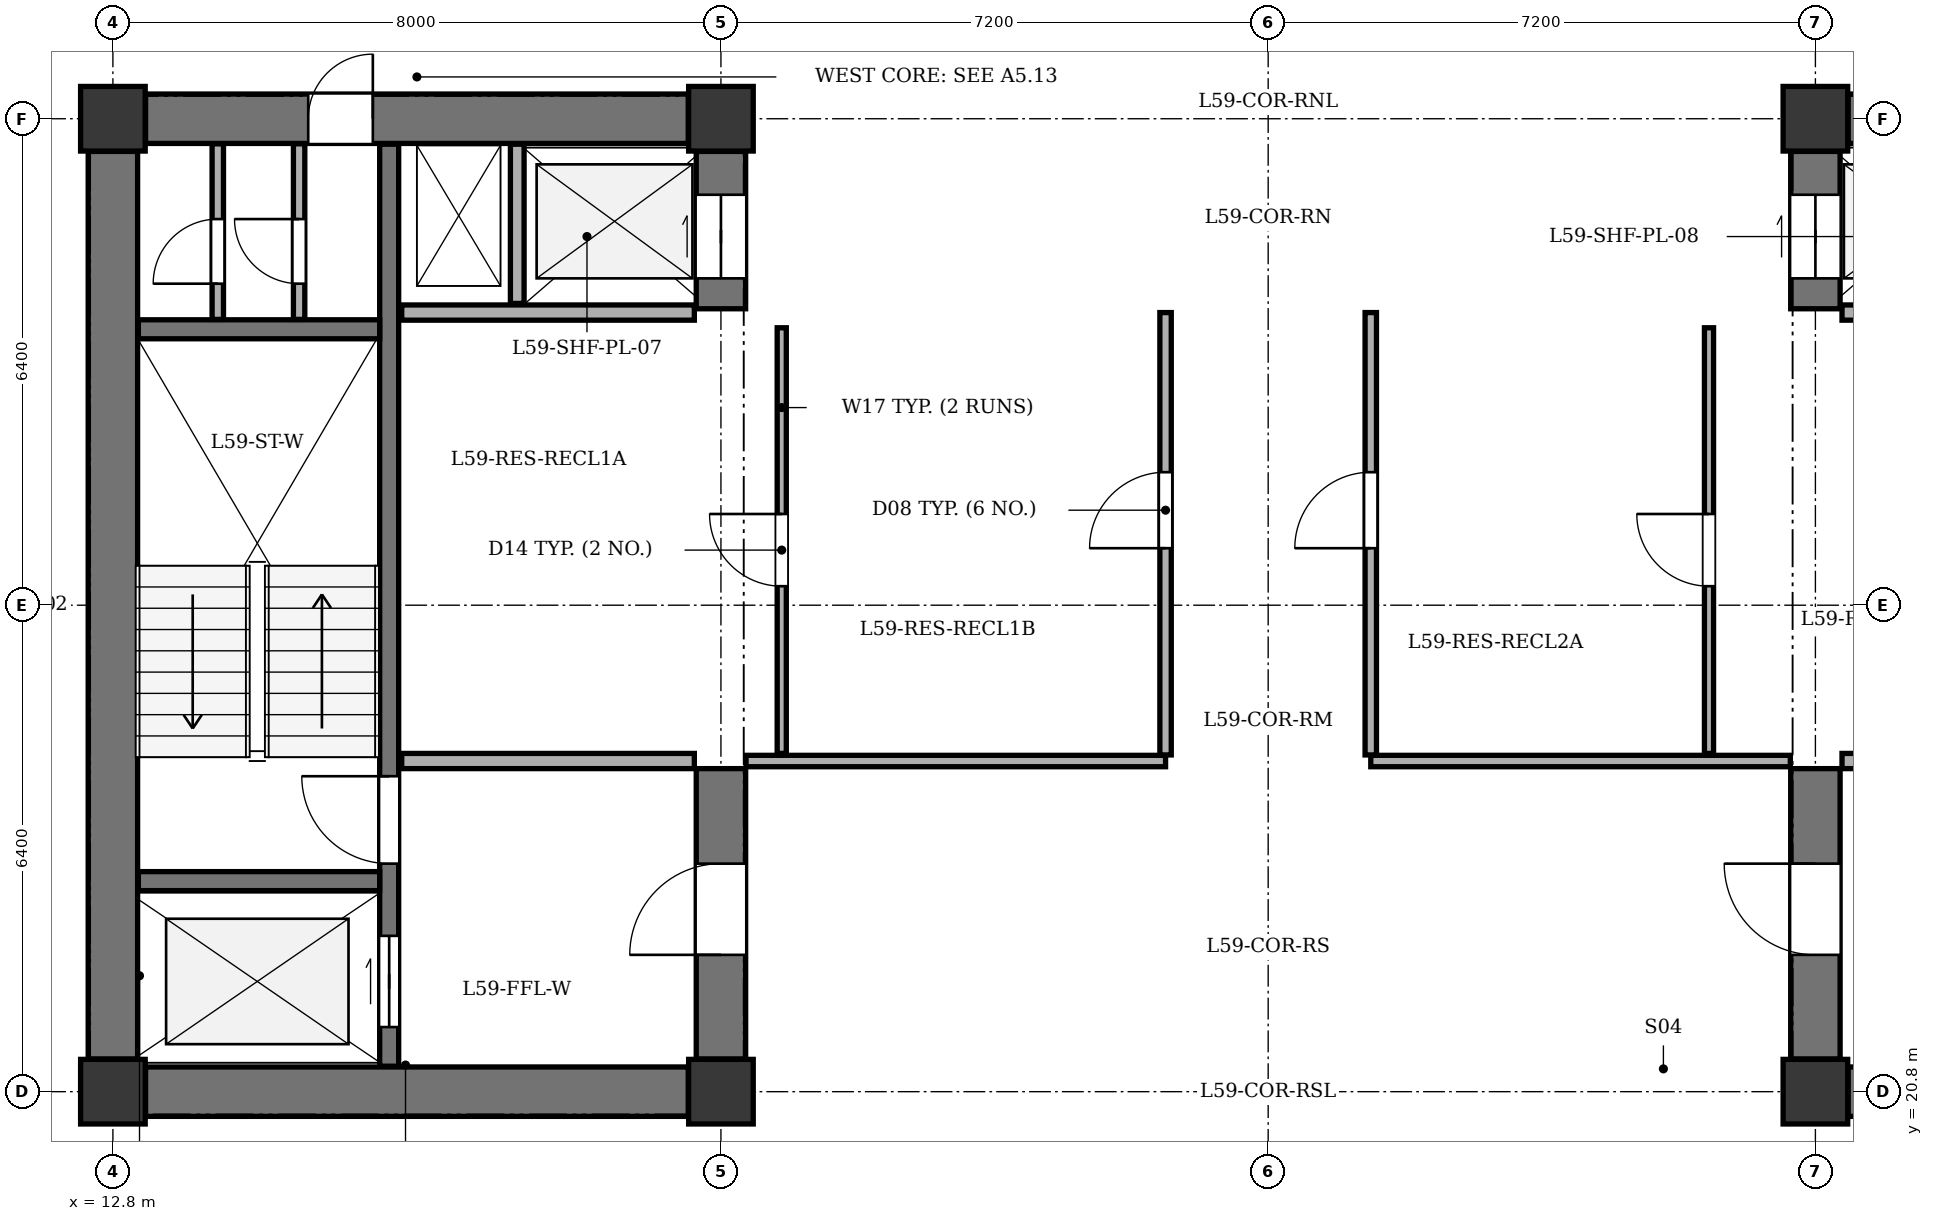
"""IFC4 building model, lengths in metres.
Left out: names, types, materials, properties, quantities, classifications, styles, units other than length and angle.
Written with IfcOpenShell. Run it as: python <this file> out.ifc"""

import sys

from ifc_helpers import new_model, si_unit, direction, frame, frame_2d, origin, origin_2d, place, context, subcontext, project, spatial, rectangle, extrude, element, fill, save


model = new_model("IFC4")
c1 = context("Model", 3, precision=1e-05, world=origin(), true_north=direction((0.0, 1.0)))
c2 = subcontext(c1, "Body", "Model", "MODEL_VIEW")
j1 = project(units=[si_unit("LENGTHUNIT", "METRE"), si_unit("PLANEANGLEUNIT", "RADIAN")], contexts=[c1])
p1 = place(None, origin())
s1 = spatial("IfcSite", under=j1, at=p1, CompositionType="ELEMENT")
p2 = place(p1, origin())
s2 = spatial("IfcBuilding", under=s1, at=p2, CompositionType="ELEMENT")
p3 = place(p2, frame((0.0, 0.0, 227.9)))
s3 = spatial("IfcBuildingStorey", under=s2, at=p3, CompositionType="ELEMENT", Elevation=227.9)
for number, where, z_axis, x_axis in (
    (1, (12.8, 20.8, 0.0), (0.0, 0.0, 1.0), (1.0, 0.0, 0.0)),
    (2, (20.8, 20.8, 0.0), (0.0, 0.0, 1.0), (1.0, 0.0, 0.0)),
    (3, (12.8, 33.6, 0.0), (0.0, 0.0, 1.0), (1.0, 0.0, 0.0)),
    (4, (20.8, 33.6, 0.0), (0.0, 0.0, 1.0), (1.0, 0.0, 0.0)),
    (5, (35.2, 20.8, 0.0), (0.0, 0.0, 1.0), (1.0, 0.0, 0.0)),
    (6, (35.2, 33.6, 0.0), (0.0, 0.0, 1.0), (1.0, 0.0, 0.0)),
):
    element("IfcColumn", number, at=place(p3, frame(where, z_axis=z_axis, x_axis=x_axis)), inside=s3, PredefinedType="COLUMN", context=c2, shape_type="SweptSolid", body=[
        extrude(rectangle(XDim=0.85, YDim=0.85, at=origin_2d()), origin(), (0.0, 0.0, 1.0), 3.4),
    ])
p4 = place(p3, frame((12.8, 21.23, 0.0), z_axis=(0.0, 0.0, 1.0), x_axis=(0.0, 1.0, 0.0)))
e7 = element("IfcWall", 7, at=p4, inside=s3, PredefinedType="SHEAR", context=c2, shape_type="SweptSolid", body=[
    extrude(rectangle(XDim=11.94, YDim=0.65, at=frame_2d((5.97, 0.0))), origin(), (0.0, 0.0, 1.0), 3.1),
])
p5 = place(p3, frame((13.23, 20.8, 0.0), z_axis=(0.0, 0.0, 1.0), x_axis=(1.0, 0.0, 0.0)))
e8 = element("IfcWall", 8, at=p5, inside=s3, PredefinedType="SHEAR", context=c2, shape_type="SweptSolid", body=[
    extrude(rectangle(XDim=7.14, YDim=0.65, at=frame_2d((3.57, 0.0))), origin(), (0.0, 0.0, 1.0), 3.1),
])
p6 = place(p3, frame((13.23, 33.6, 0.0), z_axis=(0.0, 0.0, 1.0), x_axis=(1.0, 0.0, 0.0)))
e9 = element("IfcWall", 9, at=p6, inside=s3, PredefinedType="SHEAR", context=c2, shape_type="SweptSolid", body=[
    extrude(rectangle(XDim=7.14, YDim=0.65, at=frame_2d((3.57, 0.0))), origin(), (0.0, 0.0, 1.0), 3.1),
])
p7 = place(p6, frame((2.14, 0.0, 0.0)))
e10 = element("IfcOpeningElement", 10, at=p7, cuts=e9, PredefinedType="OPENING", context=c2, shape_type="SweptSolid", body=[
    extrude(rectangle(XDim=0.85, YDim=2.02, at=frame_2d((0.425, 1.01))), frame((0.0, 0.335, 0.0), z_axis=(0.0, -1.0, 0.0), x_axis=(1.0, 0.0, 0.0)), (0.0, 0.0, 1.0), 0.67),
])
p8 = place(p3, frame((20.8, 21.23, 0.0), z_axis=(0.0, 0.0, 1.0), x_axis=(0.0, 1.0, 0.0)))
e11 = element("IfcWall", 11, at=p8, inside=s3, PredefinedType="SHEAR", context=c2, shape_type="SweptSolid", body=[
    extrude(rectangle(XDim=3.82, YDim=0.65, at=frame_2d((1.91, 0.0))), origin(), (0.0, 0.0, 1.0), 3.1),
])
p9 = place(p8, frame((1.37, 0.0, 0.0)))
e12 = element("IfcOpeningElement", 12, at=p9, cuts=e11, PredefinedType="OPENING", context=c2, shape_type="SweptSolid", body=[
    extrude(rectangle(XDim=1.2, YDim=2.15, at=frame_2d((0.6, 1.075))), frame((0.0, 0.335, 0.0), z_axis=(0.0, -1.0, 0.0), x_axis=(1.0, 0.0, 0.0)), (0.0, 0.0, 1.0), 0.67),
])
p10 = place(p3, frame((20.8, 31.1, 0.0), z_axis=(0.0, 0.0, 1.0), x_axis=(0.0, 1.0, 0.0)))
e13 = element("IfcWall", 13, at=p10, inside=s3, PredefinedType="SHEAR", context=c2, shape_type="SweptSolid", body=[
    extrude(rectangle(XDim=2.07, YDim=0.65, at=frame_2d((1.035, 0.0))), origin(), (0.0, 0.0, 1.0), 3.1),
])
p11 = place(p10, frame((0.4, 0.0, 0.0)))
e14 = element("IfcOpeningElement", 14, at=p11, cuts=e13, PredefinedType="OPENING", context=c2, shape_type="SweptSolid", body=[
    extrude(rectangle(XDim=1.1, YDim=2.1, at=frame_2d((0.55, 1.05))), frame((0.0, 0.335, 0.0), z_axis=(0.0, -1.0, 0.0), x_axis=(1.0, 0.0, 0.0)), (0.0, 0.0, 1.0), 0.67),
])
p12 = place(p3, frame((16.435, 21.135, 0.0), z_axis=(0.0, 0.0, 1.0), x_axis=(0.0, 1.0, 0.0)))
e15 = element("IfcWall", 15, at=p12, inside=s3, PredefinedType="SHEAR", context=c2, shape_type="SweptSolid", body=[
    extrude(rectangle(XDim=12.13, YDim=0.25, at=frame_2d((6.065, 0.0))), origin(), (0.0, 0.0, 1.0), 3.1),
])
p13 = place(p12, frame((0.515, 0.0, 0.0)))
e16 = element("IfcOpeningElement", 16, at=p13, cuts=e15, PredefinedType="OPENING", context=c2, shape_type="SweptSolid", body=[
    extrude(rectangle(XDim=1.2, YDim=2.15, at=frame_2d((0.6, 1.075))), frame((0.0, 0.135, 0.0), z_axis=(0.0, -1.0, 0.0), x_axis=(1.0, 0.0, 0.0)), (0.0, 0.0, 1.0), 0.27),
])
p14 = place(p12, frame((2.665, 0.0, 0.0)))
e17 = element("IfcOpeningElement", 17, at=p14, cuts=e15, PredefinedType="OPENING", context=c2, shape_type="SweptSolid", body=[
    extrude(rectangle(XDim=1.15, YDim=2.15, at=frame_2d((0.575, 1.075))), frame((0.0, 0.135, 0.0), z_axis=(0.0, -1.0, 0.0), x_axis=(1.0, 0.0, 0.0)), (0.0, 0.0, 1.0), 0.27),
])
for number, where, z_axis, x_axis in (
    (18, (13.135, 23.57, 0.0), (0.0, 0.0, 1.0), (1.0, 0.0, 0.0)),
    (19, (13.135, 30.83, 0.0), (0.0, 0.0, 1.0), (1.0, 0.0, 0.0)),
):
    element("IfcWall", number, at=place(p3, frame(where, z_axis=z_axis, x_axis=x_axis)), inside=s3, PredefinedType="SHEAR", context=c2, shape_type="SweptSolid", body=[
        extrude(rectangle(XDim=3.175, YDim=0.25, at=frame_2d((1.587, 0.0))), origin(), (0.0, 0.0, 1.0), 3.1),
    ])
for number, where, z_axis, x_axis in (
    (20, (16.6, 25.15, 0.0), (0.0, 0.0, 1.0), (1.0, 0.0, 0.0)),
    (21, (16.6, 31.05, 0.0), (0.0, 0.0, 1.0), (1.0, 0.0, 0.0)),
):
    element("IfcWall", number, at=place(p3, frame(where, z_axis=z_axis, x_axis=x_axis)), inside=s3, PredefinedType="SOLIDWALL", context=c2, shape_type="SweptSolid", body=[
        extrude(rectangle(XDim=3.85, YDim=0.2, at=frame_2d((1.925, 0.0))), origin(), (0.0, 0.0, 1.0), 3.1),
    ])
p15 = place(p3, frame((18.12, 31.17, 0.0), z_axis=(0.0, 0.0, 1.0), x_axis=(0.0, 1.0, 0.0)))
e22 = element("IfcWall", 22, at=p15, inside=s3, PredefinedType="PARTITIONING", context=c2, shape_type="SweptSolid", body=[
    extrude(rectangle(XDim=2.095, YDim=0.18, at=frame_2d((1.047, 0.0))), origin(), (0.0, 0.0, 1.0), 3.1),
])
p16 = place(p3, frame((35.63, 20.8, 0.0), z_axis=(0.0, 0.0, 1.0), x_axis=(1.0, 0.0, 0.0)))
e23 = element("IfcWall", 23, at=p16, inside=s3, PredefinedType="SHEAR", context=c2, shape_type="SweptSolid", body=[
    extrude(rectangle(XDim=7.14, YDim=0.65, at=frame_2d((3.57, 0.0))), origin(), (0.0, 0.0, 1.0), 3.1),
])
p17 = place(p3, frame((35.63, 33.6, 0.0), z_axis=(0.0, 0.0, 1.0), x_axis=(1.0, 0.0, 0.0)))
e24 = element("IfcWall", 24, at=p17, inside=s3, PredefinedType="SHEAR", context=c2, shape_type="SweptSolid", body=[
    extrude(rectangle(XDim=7.14, YDim=0.65, at=frame_2d((3.57, 0.0))), origin(), (0.0, 0.0, 1.0), 3.1),
])
p18 = place(p17, frame((4.77, 0.0, 0.0)))
e25 = element("IfcOpeningElement", 25, at=p18, cuts=e24, PredefinedType="OPENING", context=c2, shape_type="SweptSolid", body=[
    extrude(rectangle(XDim=1.3, YDim=2.15, at=frame_2d((0.65, 1.075))), frame((0.0, 0.335, 0.0), z_axis=(0.0, -1.0, 0.0), x_axis=(1.0, 0.0, 0.0)), (0.0, 0.0, 1.0), 0.67),
])
p19 = place(p17, frame((2.57, 0.0, 0.0)))
e26 = element("IfcOpeningElement", 26, at=p19, cuts=e24, PredefinedType="OPENING", context=c2, shape_type="SweptSolid", body=[
    extrude(rectangle(XDim=0.85, YDim=2.02, at=frame_2d((0.425, 1.01))), frame((0.0, 0.335, 0.0), z_axis=(0.0, -1.0, 0.0), x_axis=(1.0, 0.0, 0.0)), (0.0, 0.0, 1.0), 0.67),
])
p20 = place(p3, frame((35.2, 21.23, 0.0), z_axis=(0.0, 0.0, 1.0), x_axis=(0.0, 1.0, 0.0)))
e27 = element("IfcWall", 27, at=p20, inside=s3, PredefinedType="SHEAR", context=c2, shape_type="SweptSolid", body=[
    extrude(rectangle(XDim=3.82, YDim=0.65, at=frame_2d((1.91, 0.0))), origin(), (0.0, 0.0, 1.0), 3.1),
])
p21 = place(p20, frame((1.37, 0.0, 0.0)))
e28 = element("IfcOpeningElement", 28, at=p21, cuts=e27, PredefinedType="OPENING", context=c2, shape_type="SweptSolid", body=[
    extrude(rectangle(XDim=1.2, YDim=2.15, at=frame_2d((0.6, 1.075))), frame((0.0, 0.335, 0.0), z_axis=(0.0, -1.0, 0.0), x_axis=(1.0, 0.0, 0.0)), (0.0, 0.0, 1.0), 0.67),
])
p22 = place(p3, frame((35.2, 31.1, 0.0), z_axis=(0.0, 0.0, 1.0), x_axis=(0.0, 1.0, 0.0)))
e29 = element("IfcWall", 29, at=p22, inside=s3, PredefinedType="SHEAR", context=c2, shape_type="SweptSolid", body=[
    extrude(rectangle(XDim=2.07, YDim=0.65, at=frame_2d((1.035, 0.0))), origin(), (0.0, 0.0, 1.0), 3.1),
])
p23 = place(p22, frame((0.4, 0.0, 0.0)))
e30 = element("IfcOpeningElement", 30, at=p23, cuts=e29, PredefinedType="OPENING", context=c2, shape_type="SweptSolid", body=[
    extrude(rectangle(XDim=1.1, YDim=2.1, at=frame_2d((0.55, 1.05))), frame((0.0, 0.335, 0.0), z_axis=(0.0, -1.0, 0.0), x_axis=(1.0, 0.0, 0.0)), (0.0, 0.0, 1.0), 0.67),
])
p24 = place(p3, frame((35.55, 25.15, 0.0), z_axis=(0.0, 0.0, 1.0), x_axis=(1.0, 0.0, 0.0)))
e31 = element("IfcWall", 31, at=p24, inside=s3, PredefinedType="SOLIDWALL", context=c2, shape_type="SweptSolid", body=[
    extrude(rectangle(XDim=3.85, YDim=0.2, at=frame_2d((1.925, 0.0))), origin(), (0.0, 0.0, 1.0), 3.1),
])
p25 = place(p3, frame((35.55, 31.05, 0.0), z_axis=(0.0, 0.0, 1.0), x_axis=(1.0, 0.0, 0.0)))
e32 = element("IfcWall", 32, at=p25, inside=s3, PredefinedType="SOLIDWALL", context=c2, shape_type="SweptSolid", body=[
    extrude(rectangle(XDim=2.25, YDim=0.2, at=frame_2d((1.125, 0.0))), origin(), (0.0, 0.0, 1.0), 3.1),
])
p26 = place(p3, frame((14.18, 30.96, 0.0), z_axis=(0.0, 0.0, 1.0), x_axis=(0.0, 1.0, 0.0)))
e33 = element("IfcWall", 33, at=p26, inside=s3, PredefinedType="PARTITIONING", context=c2, shape_type="SweptSolid", body=[
    extrude(rectangle(XDim=2.31, YDim=0.15, at=frame_2d((1.155, 0.0))), origin(), (0.0, 0.0, 1.0), 3.1),
])
p27 = place(p26, frame((0.47, 0.0, 0.0)))
e34 = element("IfcOpeningElement", 34, at=p27, cuts=e33, PredefinedType="OPENING", context=c2, shape_type="SweptSolid", body=[
    extrude(rectangle(XDim=0.85, YDim=2.02, at=frame_2d((0.425, 1.01))), frame((0.0, 0.085, 0.0), z_axis=(0.0, -1.0, 0.0), x_axis=(1.0, 0.0, 0.0)), (0.0, 0.0, 1.0), 0.17),
])
p28 = place(p3, frame((15.25, 30.96, 0.0), z_axis=(0.0, 0.0, 1.0), x_axis=(0.0, 1.0, 0.0)))
e35 = element("IfcWall", 35, at=p28, inside=s3, PredefinedType="PARTITIONING", context=c2, shape_type="SweptSolid", body=[
    extrude(rectangle(XDim=2.31, YDim=0.15, at=frame_2d((1.155, 0.0))), origin(), (0.0, 0.0, 1.0), 3.1),
])
p29 = place(p28, frame((0.47, 0.0, 0.0)))
e36 = element("IfcOpeningElement", 36, at=p29, cuts=e35, PredefinedType="OPENING", context=c2, shape_type="SweptSolid", body=[
    extrude(rectangle(XDim=0.85, YDim=2.02, at=frame_2d((0.425, 1.01))), frame((0.0, 0.085, 0.0), z_axis=(0.0, -1.0, 0.0), x_axis=(1.0, 0.0, 0.0)), (0.0, 0.0, 1.0), 0.17),
])
for number, where, z_axis, x_axis in (
    (37, (21.13, 25.15, 0.0), (0.0, 0.0, 1.0), (1.0, 0.0, 0.0)),
    (38, (29.35, 25.15, 0.0), (0.0, 0.0, 1.0), (1.0, 0.0, 0.0)),
):
    element("IfcWall", number, at=place(p3, frame(where, z_axis=z_axis, x_axis=x_axis)), inside=s3, PredefinedType="PARTITIONING", context=c2, shape_type="SweptSolid", body=[
        extrude(rectangle(XDim=5.52, YDim=0.15, at=frame_2d((2.76, 0.0))), origin(), (0.0, 0.0, 1.0), 3.1),
    ])
p30 = place(p3, frame((26.65, 25.23, 0.0), z_axis=(0.0, 0.0, 1.0), x_axis=(0.0, 1.0, 0.0)))
e39 = element("IfcWall", 39, at=p30, inside=s3, PredefinedType="PARTITIONING", context=c2, shape_type="SweptSolid", body=[
    extrude(rectangle(XDim=5.82, YDim=0.15, at=frame_2d((2.91, 0.0))), origin(), (0.0, 0.0, 1.0), 3.1),
])
p31 = place(p30, frame((2.72, 0.0, 0.0)))
e40 = element("IfcOpeningElement", 40, at=p31, cuts=e39, PredefinedType="OPENING", context=c2, shape_type="SweptSolid", body=[
    extrude(rectangle(XDim=1.0, YDim=2.1, at=frame_2d((0.5, 1.05))), frame((0.0, 0.085, 0.0), z_axis=(0.0, -1.0, 0.0), x_axis=(1.0, 0.0, 0.0)), (0.0, 0.0, 1.0), 0.17),
])
p32 = place(p3, frame((21.6, 25.25, 0.0), z_axis=(0.0, 0.0, 1.0), x_axis=(0.0, 1.0, 0.0)))
e41 = element("IfcWall", 41, at=p32, inside=s3, PredefinedType="PARTITIONING", context=c2, shape_type="SweptSolid", body=[
    extrude(rectangle(XDim=5.6, YDim=0.12, at=frame_2d((2.8, 0.0))), origin(), (0.0, 0.0, 1.0), 3.1),
])
p33 = place(p32, frame((2.2, 0.0, 0.0)))
e42 = element("IfcOpeningElement", 42, at=p33, cuts=e41, PredefinedType="OPENING", context=c2, shape_type="SweptSolid", body=[
    extrude(rectangle(XDim=0.95, YDim=2.1, at=frame_2d((0.475, 1.05))), frame((0.0, 0.07, 0.0), z_axis=(0.0, -1.0, 0.0), x_axis=(1.0, 0.0, 0.0)), (0.0, 0.0, 1.0), 0.14),
])
p34 = place(p3, frame((29.35, 25.23, 0.0), z_axis=(0.0, 0.0, 1.0), x_axis=(0.0, 1.0, 0.0)))
e43 = element("IfcWall", 43, at=p34, inside=s3, PredefinedType="PARTITIONING", context=c2, shape_type="SweptSolid", body=[
    extrude(rectangle(XDim=5.82, YDim=0.15, at=frame_2d((2.91, 0.0))), origin(), (0.0, 0.0, 1.0), 3.1),
])
p35 = place(p34, frame((2.72, 0.0, 0.0)))
e44 = element("IfcOpeningElement", 44, at=p35, cuts=e43, PredefinedType="OPENING", context=c2, shape_type="SweptSolid", body=[
    extrude(rectangle(XDim=1.0, YDim=2.1, at=frame_2d((0.5, 1.05))), frame((0.0, 0.085, 0.0), z_axis=(0.0, -1.0, 0.0), x_axis=(1.0, 0.0, 0.0)), (0.0, 0.0, 1.0), 0.17),
])
p36 = place(p3, frame((33.8, 25.25, 0.0), z_axis=(0.0, 0.0, 1.0), x_axis=(0.0, 1.0, 0.0)))
e45 = element("IfcWall", 45, at=p36, inside=s3, PredefinedType="PARTITIONING", context=c2, shape_type="SweptSolid", body=[
    extrude(rectangle(XDim=5.6, YDim=0.12, at=frame_2d((2.8, 0.0))), origin(), (0.0, 0.0, 1.0), 3.1),
])
p37 = place(p36, frame((2.2, 0.0, 0.0)))
e46 = element("IfcOpeningElement", 46, at=p37, cuts=e45, PredefinedType="OPENING", context=c2, shape_type="SweptSolid", body=[
    extrude(rectangle(XDim=0.95, YDim=2.1, at=frame_2d((0.475, 1.05))), frame((0.0, 0.07, 0.0), z_axis=(0.0, -1.0, 0.0), x_axis=(1.0, 0.0, 0.0)), (0.0, 0.0, 1.0), 0.14),
])
p38 = place(p7, origin())
e47 = element("IfcDoor", 47, at=p38, inside=s3, OperationType="SINGLE_SWING_RIGHT", PredefinedType="DOOR", context=c2, shape_type="SweptSolid", body=[
    extrude(rectangle(XDim=0.85, YDim=2.02, at=frame_2d((0.425, 1.01))), frame((0.0, 0.025, 0.0), z_axis=(0.0, -1.0, 0.0), x_axis=(1.0, 0.0, 0.0)), (0.0, 0.0, 1.0), 0.05),
])
fill(e10, e47)
p39 = place(p9, origin())
e48 = element("IfcDoor", 48, at=p39, inside=s3, OperationType="SINGLE_SWING_LEFT", PredefinedType="DOOR", context=c2, shape_type="SweptSolid", body=[
    extrude(rectangle(XDim=1.2, YDim=2.15, at=frame_2d((0.6, 1.075))), frame((0.0, 0.025, 0.0), z_axis=(0.0, -1.0, 0.0), x_axis=(1.0, 0.0, 0.0)), (0.0, 0.0, 1.0), 0.05),
])
fill(e12, e48)
p40 = place(p11, origin())
e49 = element("IfcDoor", 49, at=p40, inside=s3, OperationType="DOUBLE_DOOR_SLIDING", PredefinedType="DOOR", context=c2, shape_type="SweptSolid", body=[
    extrude(rectangle(XDim=1.1, YDim=2.1, at=frame_2d((0.55, 1.05))), frame((0.0, 0.025, 0.0), z_axis=(0.0, -1.0, 0.0), x_axis=(1.0, 0.0, 0.0)), (0.0, 0.0, 1.0), 0.05),
])
fill(e14, e49)
p41 = place(p13, origin())
e50 = element("IfcDoor", 50, at=p41, inside=s3, OperationType="DOUBLE_DOOR_SLIDING", PredefinedType="DOOR", context=c2, shape_type="SweptSolid", body=[
    extrude(rectangle(XDim=1.2, YDim=2.15, at=frame_2d((0.6, 1.075))), frame((0.0, 0.025, 0.0), z_axis=(0.0, -1.0, 0.0), x_axis=(1.0, 0.0, 0.0)), (0.0, 0.0, 1.0), 0.05),
])
fill(e16, e50)
p42 = place(p14, origin())
e51 = element("IfcDoor", 51, at=p42, inside=s3, OperationType="SINGLE_SWING_RIGHT", PredefinedType="DOOR", context=c2, shape_type="SweptSolid", body=[
    extrude(rectangle(XDim=1.15, YDim=2.15, at=frame_2d((0.575, 1.075))), frame((0.0, 0.025, 0.0), z_axis=(0.0, -1.0, 0.0), x_axis=(1.0, 0.0, 0.0)), (0.0, 0.0, 1.0), 0.05),
])
fill(e17, e51)
p43 = place(p21, origin())
e52 = element("IfcDoor", 52, at=p43, inside=s3, OperationType="SINGLE_SWING_RIGHT", PredefinedType="DOOR", context=c2, shape_type="SweptSolid", body=[
    extrude(rectangle(XDim=1.2, YDim=2.15, at=frame_2d((0.6, 1.075))), frame((0.0, 0.025, 0.0), z_axis=(0.0, -1.0, 0.0), x_axis=(1.0, 0.0, 0.0)), (0.0, 0.0, 1.0), 0.05),
])
fill(e28, e52)
p44 = place(p23, origin())
e53 = element("IfcDoor", 53, at=p44, inside=s3, OperationType="DOUBLE_DOOR_SLIDING", PredefinedType="DOOR", context=c2, shape_type="SweptSolid", body=[
    extrude(rectangle(XDim=1.1, YDim=2.1, at=frame_2d((0.55, 1.05))), frame((0.0, 0.025, 0.0), z_axis=(0.0, -1.0, 0.0), x_axis=(1.0, 0.0, 0.0)), (0.0, 0.0, 1.0), 0.05),
])
fill(e30, e53)
p45 = place(p27, origin())
e54 = element("IfcDoor", 54, at=p45, inside=s3, OperationType="SINGLE_SWING_LEFT", PredefinedType="DOOR", context=c2, shape_type="SweptSolid", body=[
    extrude(rectangle(XDim=0.85, YDim=2.02, at=frame_2d((0.425, 1.01))), frame((0.0, 0.025, 0.0), z_axis=(0.0, -1.0, 0.0), x_axis=(1.0, 0.0, 0.0)), (0.0, 0.0, 1.0), 0.05),
])
fill(e34, e54)
p46 = place(p29, origin())
e55 = element("IfcDoor", 55, at=p46, inside=s3, OperationType="SINGLE_SWING_RIGHT", PredefinedType="DOOR", context=c2, shape_type="SweptSolid", body=[
    extrude(rectangle(XDim=0.85, YDim=2.02, at=frame_2d((0.425, 1.01))), frame((0.0, 0.025, 0.0), z_axis=(0.0, -1.0, 0.0), x_axis=(1.0, 0.0, 0.0)), (0.0, 0.0, 1.0), 0.05),
])
fill(e36, e55)
p47 = place(p33, origin())
e56 = element("IfcDoor", 56, at=p47, inside=s3, OperationType="SINGLE_SWING_RIGHT", PredefinedType="DOOR", context=c2, shape_type="SweptSolid", body=[
    extrude(rectangle(XDim=0.95, YDim=2.1, at=frame_2d((0.475, 1.05))), frame((0.0, 0.025, 0.0), z_axis=(0.0, -1.0, 0.0), x_axis=(1.0, 0.0, 0.0)), (0.0, 0.0, 1.0), 0.05),
])
fill(e42, e56)
p48 = place(p31, origin())
e57 = element("IfcDoor", 57, at=p48, inside=s3, OperationType="SINGLE_SWING_LEFT", PredefinedType="DOOR", context=c2, shape_type="SweptSolid", body=[
    extrude(rectangle(XDim=1.0, YDim=2.1, at=frame_2d((0.5, 1.05))), frame((0.0, 0.025, 0.0), z_axis=(0.0, -1.0, 0.0), x_axis=(1.0, 0.0, 0.0)), (0.0, 0.0, 1.0), 0.05),
])
fill(e40, e57)
p49 = place(p37, origin())
e58 = element("IfcDoor", 58, at=p49, inside=s3, OperationType="SINGLE_SWING_RIGHT", PredefinedType="DOOR", context=c2, shape_type="SweptSolid", body=[
    extrude(rectangle(XDim=0.95, YDim=2.1, at=frame_2d((0.475, 1.05))), frame((0.0, 0.025, 0.0), z_axis=(0.0, -1.0, 0.0), x_axis=(1.0, 0.0, 0.0)), (0.0, 0.0, 1.0), 0.05),
])
fill(e46, e58)
p50 = place(p35, origin())
e59 = element("IfcDoor", 59, at=p50, inside=s3, OperationType="SINGLE_SWING_LEFT", PredefinedType="DOOR", context=c2, shape_type="SweptSolid", body=[
    extrude(rectangle(XDim=1.0, YDim=2.1, at=frame_2d((0.5, 1.05))), frame((0.0, 0.025, 0.0), z_axis=(0.0, -1.0, 0.0), x_axis=(1.0, 0.0, 0.0)), (0.0, 0.0, 1.0), 0.05),
])
fill(e44, e59)
save(model, sys.argv[1])
